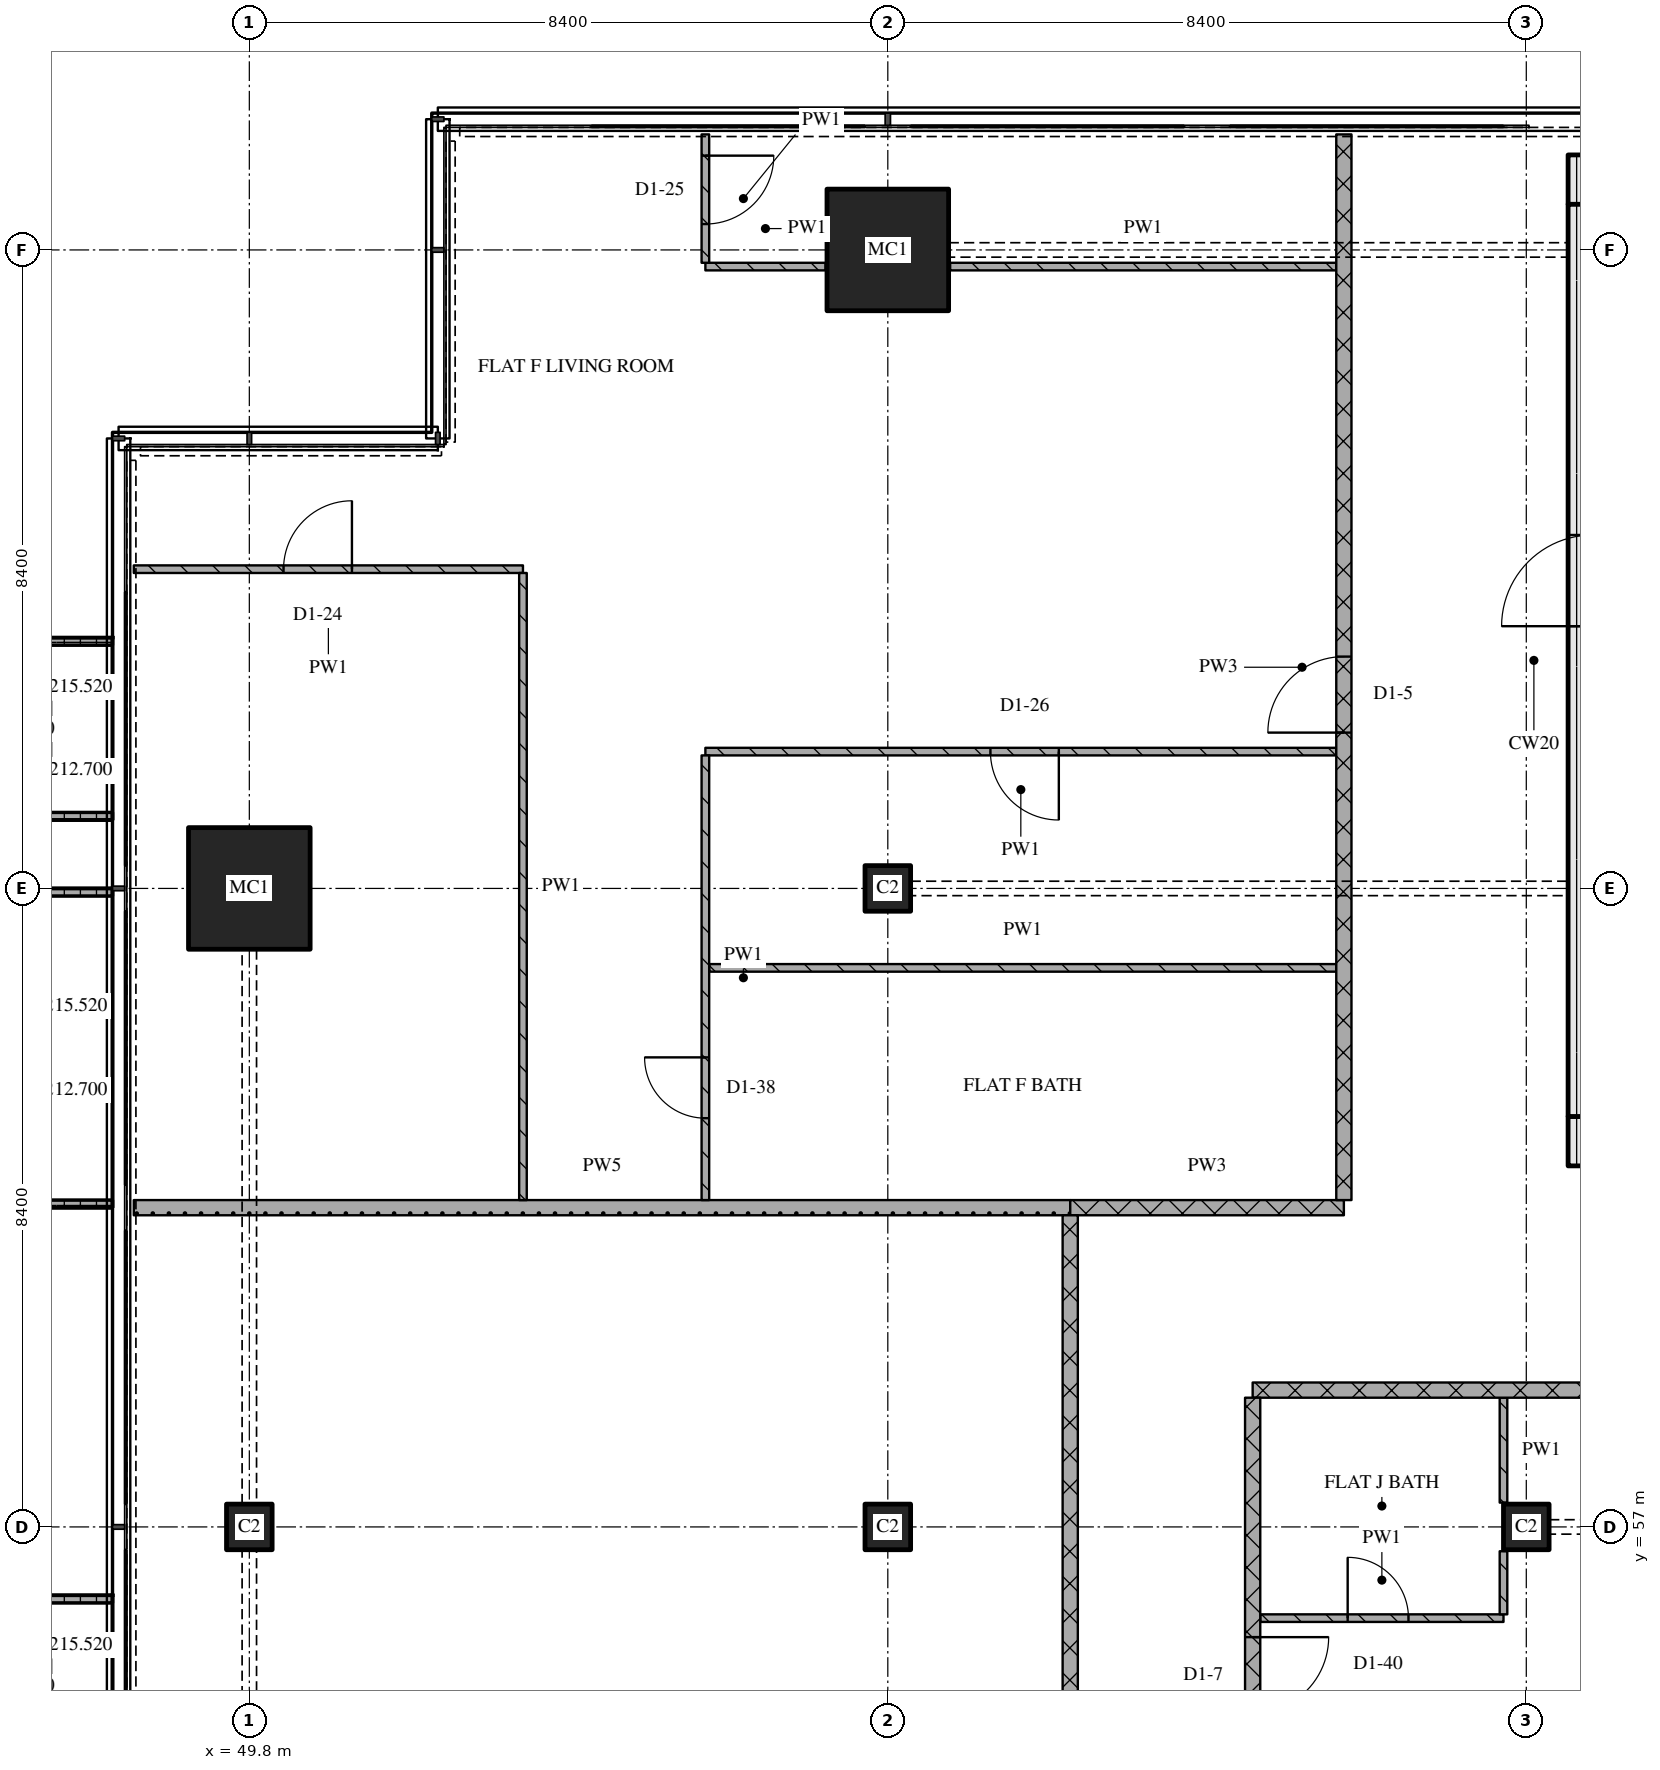
"""IFC4 building model, lengths in metres.
Left out: names, types, materials, properties, quantities, classifications, styles, units other than length and angle.
Written with IfcOpenShell. Run it as: python <this file> out.ifc"""

import sys

from ifc_helpers import new_model, si_unit, direction, frame, frame_2d, origin, origin_2d, place, context, subcontext, project, spatial, polyline, rectangle, outline, extrude, element, fill, save


model = new_model("IFC4")
c1 = context("Model", 3, precision=1e-05, world=origin(), true_north=direction((0.0, 1.0)))
c2 = subcontext(c1, "Body", "Model", "MODEL_VIEW")
j1 = project(units=[si_unit("LENGTHUNIT", "METRE"), si_unit("PLANEANGLEUNIT", "RADIAN")], contexts=[c1])
p1 = place(None, origin())
s1 = spatial("IfcSite", under=j1, at=p1, CompositionType="ELEMENT")
p2 = place(p1, origin())
s2 = spatial("IfcBuilding", under=s1, at=p2, CompositionType="ELEMENT")
p3 = place(p2, frame((0.0, 0.0, 212.7)))
s3 = spatial("IfcBuildingStorey", under=s2, at=p3, CompositionType="ELEMENT", Elevation=212.7)
p4 = place(p3, frame((49.8, 57.0, 0.0), z_axis=(0.0, 0.0, 1.0), x_axis=(1.0, 0.0, 0.0)))
e1 = element("IfcColumn", 1, at=p4, inside=s3, PredefinedType="COLUMN", context=c2, shape_type="SweptSolid", body=[
    extrude(rectangle(XDim=0.6, YDim=0.6, at=origin_2d()), origin(), (0.0, 0.0, 1.0), 3.6),
])
p5 = place(p3, frame((49.8, 65.4, 0.0), z_axis=(0.0, 0.0, 1.0), x_axis=(1.0, 0.0, 0.0)))
e2 = element("IfcColumn", 2, at=p5, inside=s3, PredefinedType="COLUMN", context=c2, shape_type="SweptSolid", body=[
    extrude(rectangle(XDim=1.6, YDim=1.6, at=origin_2d()), origin(), (0.0, 0.0, 1.0), 3.6),
])
for number, where, z_axis, x_axis in (
    (3, (58.2, 57.0, 0.0), (0.0, 0.0, 1.0), (1.0, 0.0, 0.0)),
    (4, (58.2, 65.4, 0.0), (0.0, 0.0, 1.0), (1.0, 0.0, 0.0)),
):
    element("IfcColumn", number, at=place(p3, frame(where, z_axis=z_axis, x_axis=x_axis)), inside=s3, PredefinedType="COLUMN", context=c2, shape_type="SweptSolid", body=[
        extrude(rectangle(XDim=0.6, YDim=0.6, at=origin_2d()), origin(), (0.0, 0.0, 1.0), 3.6),
    ])
p6 = place(p3, frame((58.2, 73.8, 0.0), z_axis=(0.0, 0.0, 1.0), x_axis=(1.0, 0.0, 0.0)))
e5 = element("IfcColumn", 5, at=p6, inside=s3, PredefinedType="COLUMN", context=c2, shape_type="SweptSolid", body=[
    extrude(rectangle(XDim=1.6, YDim=1.6, at=origin_2d()), origin(), (0.0, 0.0, 1.0), 3.6),
])
p7 = place(p3, frame((66.6, 57.0, 0.0), z_axis=(0.0, 0.0, 1.0), x_axis=(1.0, 0.0, 0.0)))
e6 = element("IfcColumn", 6, at=p7, inside=s3, PredefinedType="COLUMN", context=c2, shape_type="SweptSolid", body=[
    extrude(rectangle(XDim=0.6, YDim=0.6, at=origin_2d()), origin(), (0.0, 0.0, 1.0), 3.6),
])
p8 = place(p3, origin())
e7 = element("IfcWall", 7, at=p8, inside=s3, PredefinedType="SOLIDWALL", context=c2, shape_type="SweptSolid", body=[
    extrude(outline(polyline([(48.0, 68.7), (48.0, 68.6), (46.5, 68.6), (46.5, 66.4), (48.0, 66.4), (48.0, 66.3), (46.4, 66.3), (46.4, 68.7), (48.0, 68.7)])), origin(), (0.0, 0.0, 1.0), 1.0),
])
p9 = place(p3, origin())
e8 = element("IfcWall", 8, at=p9, inside=s3, PredefinedType="SOLIDWALL", context=c2, shape_type="SweptSolid", body=[
    extrude(outline(polyline([(48.0, 65.4), (48.0, 65.3), (46.367, 65.3), (46.367, 61.3), (48.0, 61.3), (48.0, 61.2), (46.267, 61.2), (46.267, 65.4), (48.0, 65.4)])), origin(), (0.0, 0.0, 1.0), 1.0),
])
p10 = place(p3, origin())
e9 = element("IfcWall", 9, at=p10, inside=s3, PredefinedType="SOLIDWALL", context=c2, shape_type="SweptSolid", body=[
    extrude(outline(polyline([(48.0, 56.1), (48.0, 56.0), (46.5, 56.0), (46.5, 53.8), (48.0, 53.8), (48.0, 53.7), (46.4, 53.7), (46.4, 56.1), (48.0, 56.1)])), origin(), (0.0, 0.0, 1.0), 1.0),
])
p11 = place(p3, frame((67.15, 62.075, 0.0), z_axis=(0.0, 0.0, 1.0), x_axis=(1.0, 0.0, 0.0)))
e10 = element("IfcWall", 10, at=p11, inside=s3, PredefinedType="SOLIDWALL", context=c2, shape_type="SweptSolid", body=[
    extrude(rectangle(XDim=40.9, YDim=0.65, at=frame_2d((20.45, 0.0))), origin(), (0.0, 0.0, 1.0), 3.32),
])
p12 = place(p11, frame((20.8, 0.0, 0.0)))
e11 = element("IfcOpeningElement", 11, at=p12, cuts=e10, PredefinedType="OPENING", context=c2, shape_type="SweptSolid", body=[
    extrude(rectangle(XDim=1.8, YDim=2.1, at=frame_2d((0.9, 1.05))), frame((0.0, 0.335, 0.0), z_axis=(0.0, -1.0, 0.0), x_axis=(1.0, 0.0, 0.0)), (0.0, 0.0, 1.0), 0.67),
])
p13 = place(p3, frame((67.15, 74.725, 0.0), z_axis=(0.0, 0.0, 1.0), x_axis=(1.0, 0.0, 0.0)))
e12 = element("IfcWall", 12, at=p13, inside=s3, PredefinedType="SOLIDWALL", context=c2, shape_type="SweptSolid", body=[
    extrude(rectangle(XDim=40.9, YDim=0.65, at=frame_2d((20.45, 0.0))), origin(), (0.0, 0.0, 1.0), 3.32),
])
p14 = place(p3, frame((67.475, 62.4, 0.0), z_axis=(0.0, 0.0, 1.0), x_axis=(0.0, 1.0, 0.0)))
e13 = element("IfcWall", 13, at=p14, inside=s3, PredefinedType="SOLIDWALL", context=c2, shape_type="SweptSolid", body=[
    extrude(rectangle(XDim=12.0, YDim=0.65, at=frame_2d((6.0, 0.0))), origin(), (0.0, 0.0, 1.0), 3.32),
])
p15 = place(p14, frame((6.45, 0.0, 0.0)))
e14 = element("IfcOpeningElement", 14, at=p15, cuts=e13, PredefinedType="OPENING", context=c2, shape_type="SweptSolid", body=[
    extrude(rectangle(XDim=1.2, YDim=2.1, at=frame_2d((0.6, 1.05))), frame((0.0, 0.335, 0.0), z_axis=(0.0, -1.0, 0.0), x_axis=(1.0, 0.0, 0.0)), (0.0, 0.0, 1.0), 0.67),
])
p16 = place(p3, frame((63.1, 55.8, 0.0), z_axis=(0.0, 0.0, 1.0), x_axis=(1.0, 0.0, 0.0)))
e15 = element("IfcWall", 15, at=p16, inside=s3, PredefinedType="PARTITIONING", context=c2, shape_type="SweptSolid", body=[
    extrude(rectangle(XDim=3.2, YDim=0.1, at=frame_2d((1.6, 0.0))), origin(), (0.0, 0.0, 1.0), 3.32),
])
p17 = place(p16, frame((1.15, 0.0, 0.0)))
e16 = element("IfcOpeningElement", 16, at=p17, cuts=e15, PredefinedType="OPENING", context=c2, shape_type="SweptSolid", body=[
    extrude(rectangle(XDim=0.8, YDim=2.1, at=frame_2d((0.4, 1.05))), frame((0.0, 0.06, 0.0), z_axis=(0.0, -1.0, 0.0), x_axis=(1.0, 0.0, 0.0)), (0.0, 0.0, 1.0), 0.12),
])
p18 = place(p3, frame((63.0, 58.8, 0.0), z_axis=(0.0, 0.0, 1.0), x_axis=(1.0, 0.0, 0.0)))
e17 = element("IfcWall", 17, at=p18, inside=s3, PredefinedType="PARTITIONING", context=c2, shape_type="SweptSolid", body=[
    extrude(rectangle(XDim=10.8, YDim=0.2, at=frame_2d((5.4, 0.0))), origin(), (0.0, 0.0, 1.0), 3.32),
])
p19 = place(p3, frame((60.6, 61.2, 0.0), z_axis=(0.0, 0.0, 1.0), x_axis=(1.0, 0.0, 0.0)))
e18 = element("IfcWall", 18, at=p19, inside=s3, PredefinedType="PARTITIONING", context=c2, shape_type="SweptSolid", body=[
    extrude(rectangle(XDim=3.6, YDim=0.2, at=frame_2d((1.8, 0.0))), origin(), (0.0, 0.0, 1.0), 3.32),
])
p20 = place(p3, frame((48.28, 61.2, 0.0), z_axis=(0.0, 0.0, 1.0), x_axis=(1.0, 0.0, 0.0)))
e19 = element("IfcWall", 19, at=p20, inside=s3, PredefinedType="PARTITIONING", context=c2, shape_type="SweptSolid", body=[
    extrude(rectangle(XDim=12.32, YDim=0.2, at=frame_2d((6.16, 0.0))), origin(), (0.0, 0.0, 1.0), 3.32),
])
p21 = place(p3, frame((55.85, 64.355, 0.0), z_axis=(0.0, 0.0, 1.0), x_axis=(1.0, 0.0, 0.0)))
e20 = element("IfcWall", 20, at=p21, inside=s3, PredefinedType="PARTITIONING", context=c2, shape_type="SweptSolid", body=[
    extrude(rectangle(XDim=8.25, YDim=0.1, at=frame_2d((4.125, 0.0))), origin(), (0.0, 0.0, 1.0), 3.32),
])
p22 = place(p3, frame((64.1, 67.2, 0.0), z_axis=(0.0, 0.0, 1.0), x_axis=(-1.0, 0.0, 0.0)))
e21 = element("IfcWall", 21, at=p22, inside=s3, PredefinedType="PARTITIONING", context=c2, shape_type="SweptSolid", body=[
    extrude(rectangle(XDim=8.3, YDim=0.1, at=frame_2d((4.15, 0.0))), origin(), (0.0, 0.0, 1.0), 3.32),
])
p23 = place(p22, frame((3.65, 0.0, 0.0)))
e22 = element("IfcOpeningElement", 22, at=p23, cuts=e21, PredefinedType="OPENING", context=c2, shape_type="SweptSolid", body=[
    extrude(rectangle(XDim=0.9, YDim=2.1, at=frame_2d((0.45, 1.05))), frame((0.0, 0.06, 0.0), z_axis=(0.0, -1.0, 0.0), x_axis=(1.0, 0.0, 0.0)), (0.0, 0.0, 1.0), 0.12),
])
p24 = place(p3, frame((53.4, 69.6, 0.0), z_axis=(0.0, 0.0, 1.0), x_axis=(-1.0, 0.0, 0.0)))
e23 = element("IfcWall", 23, at=p24, inside=s3, PredefinedType="PARTITIONING", context=c2, shape_type="SweptSolid", body=[
    extrude(rectangle(XDim=5.12, YDim=0.1, at=frame_2d((2.56, 0.0))), origin(), (0.0, 0.0, 1.0), 3.32),
])
p25 = place(p24, frame((2.25, 0.0, 0.0)))
e24 = element("IfcOpeningElement", 24, at=p25, cuts=e23, PredefinedType="OPENING", context=c2, shape_type="SweptSolid", body=[
    extrude(rectangle(XDim=0.9, YDim=2.1, at=frame_2d((0.45, 1.05))), frame((0.0, 0.06, 0.0), z_axis=(0.0, -1.0, 0.0), x_axis=(1.0, 0.0, 0.0)), (0.0, 0.0, 1.0), 0.12),
])
p26 = place(p3, frame((55.8, 73.581, 0.0), z_axis=(0.0, 0.0, 1.0), x_axis=(1.0, 0.0, 0.0)))
e25 = element("IfcWall", 25, at=p26, inside=s3, PredefinedType="PARTITIONING", context=c2, shape_type="SweptSolid", body=[
    extrude(rectangle(XDim=1.58, YDim=0.1, at=frame_2d((0.79, 0.0))), origin(), (0.0, 0.0, 1.0), 3.32),
])
p27 = place(p3, frame((59.02, 73.581, 0.0), z_axis=(0.0, 0.0, 1.0), x_axis=(1.0, 0.0, 0.0)))
e26 = element("IfcWall", 26, at=p27, inside=s3, PredefinedType="PARTITIONING", context=c2, shape_type="SweptSolid", body=[
    extrude(rectangle(XDim=5.08, YDim=0.1, at=frame_2d((2.54, 0.0))), origin(), (0.0, 0.0, 1.0), 3.32),
])
p28 = place(p3, frame((53.4, 69.55, 0.0), z_axis=(0.0, 0.0, 1.0), x_axis=(0.0, -1.0, 0.0)))
e27 = element("IfcWall", 27, at=p28, inside=s3, PredefinedType="PARTITIONING", context=c2, shape_type="SweptSolid", body=[
    extrude(rectangle(XDim=8.25, YDim=0.1, at=frame_2d((4.125, 0.0))), origin(), (0.0, 0.0, 1.0), 3.32),
])
p29 = place(p3, frame((55.8, 67.15, 0.0), z_axis=(0.0, 0.0, 1.0), x_axis=(0.0, -1.0, 0.0)))
e28 = element("IfcWall", 28, at=p29, inside=s3, PredefinedType="PARTITIONING", context=c2, shape_type="SweptSolid", body=[
    extrude(rectangle(XDim=5.85, YDim=0.1, at=frame_2d((2.925, 0.0))), origin(), (0.0, 0.0, 1.0), 3.32),
])
p30 = place(p29, frame((3.973, 0.0, 0.0)))
e29 = element("IfcOpeningElement", 29, at=p30, cuts=e28, PredefinedType="OPENING", context=c2, shape_type="SweptSolid", body=[
    extrude(rectangle(XDim=0.8, YDim=2.1, at=frame_2d((0.4, 1.05))), frame((0.0, 0.06, 0.0), z_axis=(0.0, -1.0, 0.0), x_axis=(1.0, 0.0, 0.0)), (0.0, 0.0, 1.0), 0.12),
])
p31 = place(p3, frame((55.8, 75.32, 0.0), z_axis=(0.0, 0.0, 1.0), x_axis=(0.0, -1.0, 0.0)))
e30 = element("IfcWall", 30, at=p31, inside=s3, PredefinedType="PARTITIONING", context=c2, shape_type="SweptSolid", body=[
    extrude(rectangle(XDim=1.689, YDim=0.1, at=frame_2d((0.844, 0.0))), origin(), (0.0, 0.0, 1.0), 3.32),
])
p32 = place(p31, frame((0.28, 0.0, 0.0)))
e31 = element("IfcOpeningElement", 31, at=p32, cuts=e30, PredefinedType="OPENING", context=c2, shape_type="SweptSolid", body=[
    extrude(rectangle(XDim=0.9, YDim=2.1, at=frame_2d((0.45, 1.05))), frame((0.0, 0.06, 0.0), z_axis=(0.0, -1.0, 0.0), x_axis=(1.0, 0.0, 0.0)), (0.0, 0.0, 1.0), 0.12),
])
p33 = place(p3, frame((60.6, 61.1, 0.0), z_axis=(0.0, 0.0, 1.0), x_axis=(0.0, -1.0, 0.0)))
e32 = element("IfcWall", 32, at=p33, inside=s3, PredefinedType="PARTITIONING", context=c2, shape_type="SweptSolid", body=[
    extrude(rectangle(XDim=17.8, YDim=0.2, at=frame_2d((8.9, 0.0))), origin(), (0.0, 0.0, 1.0), 3.32),
])
p34 = place(p3, frame((63.0, 58.7, 0.0), z_axis=(0.0, 0.0, 1.0), x_axis=(0.0, -1.0, 0.0)))
e33 = element("IfcWall", 33, at=p34, inside=s3, PredefinedType="PARTITIONING", context=c2, shape_type="SweptSolid", body=[
    extrude(rectangle(XDim=15.4, YDim=0.2, at=frame_2d((7.7, 0.0))), origin(), (0.0, 0.0, 1.0), 3.32),
])
p35 = place(p34, frame((3.15, 0.0, 0.0)))
e34 = element("IfcOpeningElement", 34, at=p35, cuts=e33, PredefinedType="OPENING", context=c2, shape_type="SweptSolid", body=[
    extrude(rectangle(XDim=1.0, YDim=2.1, at=frame_2d((0.5, 1.05))), frame((0.0, 0.11, 0.0), z_axis=(0.0, -1.0, 0.0), x_axis=(1.0, 0.0, 0.0)), (0.0, 0.0, 1.0), 0.22),
])
p36 = place(p34, frame((11.25, 0.0, 0.0)))
e35 = element("IfcOpeningElement", 35, at=p36, cuts=e33, PredefinedType="OPENING", context=c2, shape_type="SweptSolid", body=[
    extrude(rectangle(XDim=0.9, YDim=2.1, at=frame_2d((0.45, 1.05))), frame((0.0, 0.11, 0.0), z_axis=(0.0, -1.0, 0.0), x_axis=(1.0, 0.0, 0.0)), (0.0, 0.0, 1.0), 0.22),
])
p37 = place(p3, frame((64.2, 61.3, 0.0), z_axis=(0.0, 0.0, 1.0), x_axis=(0.0, 1.0, 0.0)))
e36 = element("IfcWall", 36, at=p37, inside=s3, PredefinedType="PARTITIONING", context=c2, shape_type="SweptSolid", body=[
    extrude(rectangle(XDim=14.02, YDim=0.2, at=frame_2d((7.01, 0.0))), origin(), (0.0, 0.0, 1.0), 3.32),
])
p38 = place(p37, frame((6.15, 0.0, 0.0)))
e37 = element("IfcOpeningElement", 37, at=p38, cuts=e36, PredefinedType="OPENING", context=c2, shape_type="SweptSolid", body=[
    extrude(rectangle(XDim=1.0, YDim=2.1, at=frame_2d((0.5, 1.05))), frame((0.0, 0.11, 0.0), z_axis=(0.0, -1.0, 0.0), x_axis=(1.0, 0.0, 0.0)), (0.0, 0.0, 1.0), 0.22),
])
p39 = place(p3, frame((66.3, 56.68, 0.0), z_axis=(0.0, 0.0, 1.0), x_axis=(0.0, -1.0, 0.0)))
e38 = element("IfcWall", 38, at=p39, inside=s3, PredefinedType="PARTITIONING", context=c2, shape_type="SweptSolid", body=[
    extrude(rectangle(XDim=0.83, YDim=0.1, at=frame_2d((0.415, 0.0))), origin(), (0.0, 0.0, 1.0), 3.32),
])
p40 = place(p3, frame((66.3, 58.7, 0.0), z_axis=(0.0, 0.0, 1.0), x_axis=(0.0, -1.0, 0.0)))
e39 = element("IfcWall", 39, at=p40, inside=s3, PredefinedType="PARTITIONING", context=c2, shape_type="SweptSolid", body=[
    extrude(rectangle(XDim=1.38, YDim=0.1, at=frame_2d((0.69, 0.0))), origin(), (0.0, 0.0, 1.0), 3.32),
])
p41 = place(p17, origin())
e40 = element("IfcDoor", 40, at=p41, inside=s3, OperationType="SINGLE_SWING_LEFT", PredefinedType="DOOR", context=c2, shape_type="SweptSolid", body=[
    extrude(rectangle(XDim=0.8, YDim=2.1, at=frame_2d((0.4, 1.05))), frame((0.0, 0.025, 0.0), z_axis=(0.0, -1.0, 0.0), x_axis=(1.0, 0.0, 0.0)), (0.0, 0.0, 1.0), 0.05),
])
fill(e16, e40)
p42 = place(p23, origin())
e41 = element("IfcDoor", 41, at=p42, inside=s3, OperationType="SINGLE_SWING_LEFT", PredefinedType="DOOR", context=c2, shape_type="SweptSolid", body=[
    extrude(rectangle(XDim=0.9, YDim=2.1, at=frame_2d((0.45, 1.05))), frame((0.0, 0.025, 0.0), z_axis=(0.0, -1.0, 0.0), x_axis=(1.0, 0.0, 0.0)), (0.0, 0.0, 1.0), 0.05),
])
fill(e22, e41)
p43 = place(p25, origin())
e42 = element("IfcDoor", 42, at=p43, inside=s3, OperationType="SINGLE_SWING_RIGHT", PredefinedType="DOOR", context=c2, shape_type="SweptSolid", body=[
    extrude(rectangle(XDim=0.9, YDim=2.1, at=frame_2d((0.45, 1.05))), frame((0.0, 0.025, 0.0), z_axis=(0.0, -1.0, 0.0), x_axis=(1.0, 0.0, 0.0)), (0.0, 0.0, 1.0), 0.05),
])
fill(e24, e42)
p44 = place(p30, origin())
e43 = element("IfcDoor", 43, at=p44, inside=s3, OperationType="SINGLE_SWING_RIGHT", PredefinedType="DOOR", context=c2, shape_type="SweptSolid", body=[
    extrude(rectangle(XDim=0.8, YDim=2.1, at=frame_2d((0.4, 1.05))), frame((0.0, 0.025, 0.0), z_axis=(0.0, -1.0, 0.0), x_axis=(1.0, 0.0, 0.0)), (0.0, 0.0, 1.0), 0.05),
])
fill(e29, e43)
p45 = place(p32, origin())
e44 = element("IfcDoor", 44, at=p45, inside=s3, OperationType="SINGLE_SWING_LEFT", PredefinedType="DOOR", context=c2, shape_type="SweptSolid", body=[
    extrude(rectangle(XDim=0.9, YDim=2.1, at=frame_2d((0.45, 1.05))), frame((0.0, 0.025, 0.0), z_axis=(0.0, -1.0, 0.0), x_axis=(1.0, 0.0, 0.0)), (0.0, 0.0, 1.0), 0.05),
])
fill(e31, e44)
p46 = place(p35, origin())
e45 = element("IfcDoor", 45, at=p46, inside=s3, OperationType="SINGLE_SWING_LEFT", PredefinedType="DOOR", context=c2, shape_type="SweptSolid", body=[
    extrude(rectangle(XDim=1.0, YDim=2.1, at=frame_2d((0.5, 1.05))), frame((0.0, 0.025, 0.0), z_axis=(0.0, -1.0, 0.0), x_axis=(1.0, 0.0, 0.0)), (0.0, 0.0, 1.0), 0.05),
])
fill(e34, e45)
p47 = place(p38, origin())
e46 = element("IfcDoor", 46, at=p47, inside=s3, OperationType="SINGLE_SWING_LEFT", PredefinedType="DOOR", context=c2, shape_type="SweptSolid", body=[
    extrude(rectangle(XDim=1.0, YDim=2.1, at=frame_2d((0.5, 1.05))), frame((0.0, 0.025, 0.0), z_axis=(0.0, -1.0, 0.0), x_axis=(1.0, 0.0, 0.0)), (0.0, 0.0, 1.0), 0.05),
])
fill(e37, e46)
save(model, sys.argv[1])
